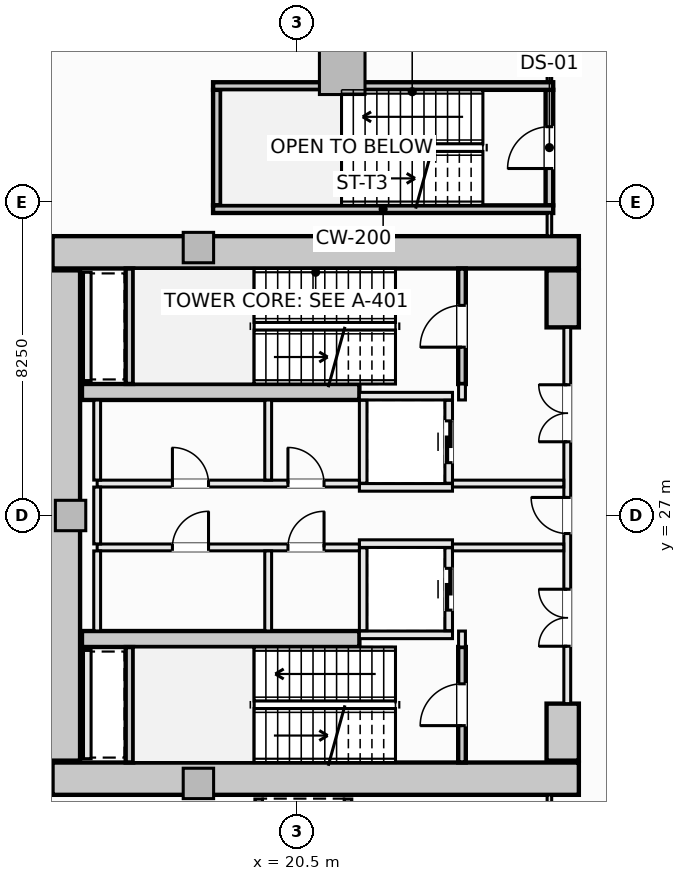
"""IFC4 building model, lengths in metres.
Left out: names, types, materials, properties, quantities, classifications, styles, units other than length and angle.
Written with IfcOpenShell. Run it as: python <this file> out.ifc"""

import sys

from ifc_helpers import new_model, si_unit, direction, frame, frame_2d, origin, origin_2d, place, context, subcontext, project, spatial, rectangle, extrude, element, fill, save


model = new_model("IFC4")
c1 = context("Model", 3, precision=1e-05, world=origin(), true_north=direction((0.0, 1.0)))
c2 = subcontext(c1, "Body", "Model", "MODEL_VIEW")
j1 = project(units=[si_unit("LENGTHUNIT", "METRE"), si_unit("PLANEANGLEUNIT", "RADIAN")], contexts=[c1])
p1 = place(None, origin())
s1 = spatial("IfcSite", under=j1, at=p1, CompositionType="ELEMENT")
p2 = place(p1, origin())
s2 = spatial("IfcBuilding", under=s1, at=p2, CompositionType="ELEMENT")
p3 = place(p2, frame((0.0, 0.0, -4.5)))
s3 = spatial("IfcBuildingStorey", under=s2, at=p3, CompositionType="ELEMENT", Elevation=-4.5)
for number, where, z_axis, x_axis in (
    (1, (14.075, 33.925, -0.32), (0.0, 0.0, 1.0), (1.0, 0.0, 0.0)),
    (2, (14.075, 20.075, -0.32), (0.0, 0.0, 1.0), (1.0, 0.0, 0.0)),
):
    element("IfcWall", number, at=place(p3, frame(where, z_axis=z_axis, x_axis=x_axis)), inside=s3, PredefinedType="SHEAR", context=c2, shape_type="SweptSolid", body=[
        extrude(rectangle(XDim=13.85, YDim=0.85, at=frame_2d((6.925, 0.0))), origin(), (0.0, 0.0, 1.0), 4.46),
    ])
p4 = place(p3, frame((14.375, 20.55, -0.32), z_axis=(0.0, 0.0, 1.0), x_axis=(0.0, 1.0, 0.0)))
e3 = element("IfcWall", 3, at=p4, inside=s3, PredefinedType="SHEAR", context=c2, shape_type="SweptSolid", body=[
    extrude(rectangle(XDim=12.9, YDim=0.85, at=frame_2d((6.45, 0.0))), origin(), (0.0, 0.0, 1.0), 4.46),
])
for number, where, z_axis, x_axis in (
    (4, (27.5, 31.95, -0.32), (0.0, 0.0, 1.0), (0.0, 1.0, 0.0)),
    (5, (27.5, 20.55, -0.32), (0.0, 0.0, 1.0), (0.0, 1.0, 0.0)),
):
    element("IfcWall", number, at=place(p3, frame(where, z_axis=z_axis, x_axis=x_axis)), inside=s3, PredefinedType="SHEAR", context=c2, shape_type="SweptSolid", body=[
        extrude(rectangle(XDim=1.5, YDim=0.85, at=frame_2d((0.75, 0.0))), origin(), (0.0, 0.0, 1.0), 4.46),
    ])
for number, where, z_axis, x_axis in (
    (6, (14.85, 30.25, -0.32), (0.0, 0.0, 1.0), (1.0, 0.0, 0.0)),
    (7, (14.85, 23.75, -0.32), (0.0, 0.0, 1.0), (1.0, 0.0, 0.0)),
):
    element("IfcWall", number, at=place(p3, frame(where, z_axis=z_axis, x_axis=x_axis)), inside=s3, PredefinedType="SHEAR", context=c2, shape_type="SweptSolid", body=[
        extrude(rectangle(XDim=7.3, YDim=0.42, at=frame_2d((3.65, 0.0))), origin(), (0.0, 0.0, 1.0), 4.46),
    ])
p5 = place(p3, frame((21.698, 38.677, -0.32), z_axis=(0.0, 0.0, 1.0), x_axis=(1.0, 0.0, 0.0)))
e8 = element("IfcColumn", 8, at=p5, inside=s3, PredefinedType="COLUMN", context=c2, shape_type="SweptSolid", body=[
    extrude(rectangle(XDim=1.2, YDim=1.2, at=origin_2d()), origin(), (0.0, 0.0, 1.0), 4.46),
])
for number, where, z_axis, x_axis in (
    (9, (17.914, 34.05, -0.32), (0.0, 0.0, 1.0), (1.0, 0.0, 0.0)),
    (10, (14.55, 27.0, -0.32), (0.0, 0.0, 1.0), (1.0, 0.0, 0.0)),
    (11, (17.914, 19.95, -0.32), (0.0, 0.0, 1.0), (1.0, 0.0, 0.0)),
):
    element("IfcColumn", number, at=place(p3, frame(where, z_axis=z_axis, x_axis=x_axis)), inside=s3, PredefinedType="PILASTER", context=c2, shape_type="SweptSolid", body=[
        extrude(rectangle(XDim=0.8, YDim=0.8, at=origin_2d()), origin(), (0.0, 0.0, 1.0), 4.46),
    ])
p6 = place(p3, frame((24.85, 30.46, -0.32), z_axis=(0.0, 0.0, 1.0), x_axis=(0.0, 1.0, 0.0)))
e12 = element("IfcWall", 12, at=p6, inside=s3, PredefinedType="SHEAR", context=c2, shape_type="SweptSolid", body=[
    extrude(rectangle(XDim=3.038, YDim=0.2, at=frame_2d((1.519, 0.0))), origin(), (0.0, 0.0, 1.0), 4.46),
])
p7 = place(p6, frame((0.969, 0.0, 0.32)))
e13 = element("IfcOpeningElement", 13, at=p7, cuts=e12, PredefinedType="OPENING", context=c2, shape_type="SweptSolid", body=[
    extrude(rectangle(XDim=1.1, YDim=2.15, at=frame_2d((0.55, 1.075))), frame((0.0, 0.11, 0.0), z_axis=(0.0, -1.0, 0.0), x_axis=(1.0, 0.0, 0.0)), (0.0, 0.0, 1.0), 0.22),
])
p8 = place(p3, frame((16.1, 30.462, -0.32), z_axis=(0.0, 0.0, 1.0), x_axis=(0.0, 1.0, 0.0)))
e14 = element("IfcWall", 14, at=p8, inside=s3, PredefinedType="SHEAR", context=c2, shape_type="SweptSolid", body=[
    extrude(rectangle(XDim=3.036, YDim=0.2, at=frame_2d((1.518, 0.0))), origin(), (0.0, 0.0, 1.0), 4.46),
])
p9 = place(p3, frame((24.85, 20.502, -0.32), z_axis=(0.0, 0.0, 1.0), x_axis=(0.0, 1.0, 0.0)))
e15 = element("IfcWall", 15, at=p9, inside=s3, PredefinedType="SHEAR", context=c2, shape_type="SweptSolid", body=[
    extrude(rectangle(XDim=3.038, YDim=0.2, at=frame_2d((1.519, 0.0))), origin(), (0.0, 0.0, 1.0), 4.46),
])
p10 = place(p9, frame((0.969, 0.0, 0.32)))
e16 = element("IfcOpeningElement", 16, at=p10, cuts=e15, PredefinedType="OPENING", context=c2, shape_type="SweptSolid", body=[
    extrude(rectangle(XDim=1.1, YDim=2.15, at=frame_2d((0.55, 1.075))), frame((0.0, 0.11, 0.0), z_axis=(0.0, -1.0, 0.0), x_axis=(1.0, 0.0, 0.0)), (0.0, 0.0, 1.0), 0.22),
])
p11 = place(p3, frame((16.1, 20.502, -0.32), z_axis=(0.0, 0.0, 1.0), x_axis=(0.0, 1.0, 0.0)))
e17 = element("IfcWall", 17, at=p11, inside=s3, PredefinedType="SHEAR", context=c2, shape_type="SweptSolid", body=[
    extrude(rectangle(XDim=3.036, YDim=0.2, at=frame_2d((1.518, 0.0))), origin(), (0.0, 0.0, 1.0), 4.46),
])
p12 = place(p3, frame((27.15, 35.16, -0.32), z_axis=(0.0, 0.0, 1.0), x_axis=(0.0, 1.0, 0.0)))
e18 = element("IfcWall", 18, at=p12, inside=s3, PredefinedType="SHEAR", context=c2, shape_type="SweptSolid", body=[
    extrude(rectangle(XDim=3.04, YDim=0.2, at=frame_2d((1.52, 0.0))), origin(), (0.0, 0.0, 1.0), 4.46),
])
p13 = place(p12, frame((0.97, 0.0, 0.32)))
e19 = element("IfcOpeningElement", 19, at=p13, cuts=e18, PredefinedType="OPENING", context=c2, shape_type="SweptSolid", body=[
    extrude(rectangle(XDim=1.1, YDim=2.15, at=frame_2d((0.55, 1.075))), frame((0.0, 0.11, 0.0), z_axis=(0.0, -1.0, 0.0), x_axis=(1.0, 0.0, 0.0)), (0.0, 0.0, 1.0), 0.22),
])
p14 = place(p3, frame((18.4, 35.16, -0.32), z_axis=(0.0, 0.0, 1.0), x_axis=(0.0, 1.0, 0.0)))
e20 = element("IfcWall", 20, at=p14, inside=s3, PredefinedType="SHEAR", context=c2, shape_type="SweptSolid", body=[
    extrude(rectangle(XDim=3.04, YDim=0.2, at=frame_2d((1.52, 0.0))), origin(), (0.0, 0.0, 1.0), 4.46),
])
for number, where, z_axis, x_axis in (
    (21, (18.3, 38.3, -0.32), (0.0, 0.0, 1.0), (1.0, 0.0, 0.0)),
    (22, (18.3, 35.06, -0.32), (0.0, 0.0, 1.0), (1.0, 0.0, 0.0)),
):
    element("IfcWall", number, at=place(p3, frame(where, z_axis=z_axis, x_axis=x_axis)), inside=s3, PredefinedType="SHEAR", context=c2, shape_type="SweptSolid", body=[
        extrude(rectangle(XDim=8.95, YDim=0.2, at=frame_2d((4.475, 0.0))), origin(), (0.0, 0.0, 1.0), 4.46),
    ])
for number, where, z_axis, x_axis in (
    (23, (22.15, 30.14, 0.0), (0.0, 0.0, 1.0), (1.0, 0.0, 0.0)),
    (24, (22.15, 27.74, 0.0), (0.0, 0.0, 1.0), (1.0, 0.0, 0.0)),
):
    element("IfcWall", number, at=place(p3, frame(where, z_axis=z_axis, x_axis=x_axis)), inside=s3, PredefinedType="SOLIDWALL", context=c2, shape_type="SweptSolid", body=[
        extrude(rectangle(XDim=2.45, YDim=0.2, at=frame_2d((1.225, 0.0))), origin(), (0.0, 0.0, 1.0), 4.14),
    ])
p15 = place(p3, frame((22.25, 27.85, 0.0), z_axis=(0.0, 0.0, 1.0), x_axis=(0.0, 1.0, 0.0)))
e25 = element("IfcWall", 25, at=p15, inside=s3, PredefinedType="SOLIDWALL", context=c2, shape_type="SweptSolid", body=[
    extrude(rectangle(XDim=2.18, YDim=0.2, at=frame_2d((1.09, 0.0))), origin(), (0.0, 0.0, 1.0), 4.14),
])
p16 = place(p3, frame((24.5, 27.85, 0.0), z_axis=(0.0, 0.0, 1.0), x_axis=(0.0, 1.0, 0.0)))
e26 = element("IfcWall", 26, at=p16, inside=s3, PredefinedType="SOLIDWALL", context=c2, shape_type="SweptSolid", body=[
    extrude(rectangle(XDim=2.18, YDim=0.2, at=frame_2d((1.09, 0.0))), origin(), (0.0, 0.0, 1.0), 4.14),
])
p17 = place(p16, frame((0.54, 0.0, 0.0)))
e27 = element("IfcOpeningElement", 27, at=p17, cuts=e26, PredefinedType="OPENING", context=c2, shape_type="SweptSolid", body=[
    extrude(rectangle(XDim=1.1, YDim=2.2, at=frame_2d((0.55, 1.1))), frame((0.0, 0.11, 0.0), z_axis=(0.0, -1.0, 0.0), x_axis=(1.0, 0.0, 0.0)), (0.0, 0.0, 1.0), 0.22),
])
for number, where, z_axis, x_axis in (
    (28, (22.15, 26.26, 0.0), (0.0, 0.0, 1.0), (1.0, 0.0, 0.0)),
    (29, (22.15, 23.86, 0.0), (0.0, 0.0, 1.0), (1.0, 0.0, 0.0)),
):
    element("IfcWall", number, at=place(p3, frame(where, z_axis=z_axis, x_axis=x_axis)), inside=s3, PredefinedType="SOLIDWALL", context=c2, shape_type="SweptSolid", body=[
        extrude(rectangle(XDim=2.45, YDim=0.2, at=frame_2d((1.225, 0.0))), origin(), (0.0, 0.0, 1.0), 4.14),
    ])
p18 = place(p3, frame((22.25, 23.97, 0.0), z_axis=(0.0, 0.0, 1.0), x_axis=(0.0, 1.0, 0.0)))
e30 = element("IfcWall", 30, at=p18, inside=s3, PredefinedType="SOLIDWALL", context=c2, shape_type="SweptSolid", body=[
    extrude(rectangle(XDim=2.18, YDim=0.2, at=frame_2d((1.09, 0.0))), origin(), (0.0, 0.0, 1.0), 4.14),
])
p19 = place(p3, frame((24.5, 23.97, 0.0), z_axis=(0.0, 0.0, 1.0), x_axis=(0.0, 1.0, 0.0)))
e31 = element("IfcWall", 31, at=p19, inside=s3, PredefinedType="SOLIDWALL", context=c2, shape_type="SweptSolid", body=[
    extrude(rectangle(XDim=2.18, YDim=0.2, at=frame_2d((1.09, 0.0))), origin(), (0.0, 0.0, 1.0), 4.14),
])
p20 = place(p19, frame((0.54, 0.0, 0.0)))
e32 = element("IfcOpeningElement", 32, at=p20, cuts=e31, PredefinedType="OPENING", context=c2, shape_type="SweptSolid", body=[
    extrude(rectangle(XDim=1.1, YDim=2.2, at=frame_2d((0.55, 1.1))), frame((0.0, 0.11, 0.0), z_axis=(0.0, -1.0, 0.0), x_axis=(1.0, 0.0, 0.0)), (0.0, 0.0, 1.0), 0.22),
])
for number, where, z_axis, x_axis in (
    (33, (19.5, 17.01, 0.0), (0.0, 0.0, 1.0), (0.0, 1.0, 0.0)),
    (34, (21.85, 17.01, 0.0), (0.0, 0.0, 1.0), (0.0, 1.0, 0.0)),
):
    element("IfcWall", number, at=place(p3, frame(where, z_axis=z_axis, x_axis=x_axis)), inside=s3, PredefinedType="SOLIDWALL", context=c2, shape_type="SweptSolid", body=[
        extrude(rectangle(XDim=2.53, YDim=0.2, at=frame_2d((1.265, 0.0))), origin(), (0.0, 0.0, 1.0), 4.14),
    ])
for number, where, z_axis, x_axis in (
    (35, (14.99, 30.55, 0.0), (0.0, 0.0, 1.0), (0.0, 1.0, 0.0)),
    (36, (14.99, 20.6, 0.0), (0.0, 0.0, 1.0), (0.0, 1.0, 0.0)),
):
    element("IfcWall", number, at=place(p3, frame(where, z_axis=z_axis, x_axis=x_axis)), inside=s3, PredefinedType="SOLIDWALL", context=c2, shape_type="SweptSolid", body=[
        extrude(rectangle(XDim=2.85, YDim=0.2, at=frame_2d((1.425, 0.0))), origin(), (0.0, 0.0, 1.0), 4.14),
    ])
for number, where, z_axis, x_axis in (
    (37, (24.85, 23.54, 0.0), (0.0, 0.0, 1.0), (0.0, 1.0, 0.0)),
    (38, (24.85, 30.04, 0.0), (0.0, 0.0, 1.0), (0.0, 1.0, 0.0)),
):
    element("IfcWall", number, at=place(p3, frame(where, z_axis=z_axis, x_axis=x_axis)), inside=s3, PredefinedType="SOLIDWALL", context=c2, shape_type="SweptSolid", body=[
        extrude(rectangle(XDim=0.42, YDim=0.18, at=frame_2d((0.21, 0.0))), origin(), (0.0, 0.0, 1.0), 4.14),
    ])
p21 = place(p3, frame((27.62, 22.05, 0.0), z_axis=(0.0, 0.0, 1.0), x_axis=(0.0, 1.0, 0.0)))
e39 = element("IfcWall", 39, at=p21, inside=s3, PredefinedType="SOLIDWALL", context=c2, shape_type="SweptSolid", body=[
    extrude(rectangle(XDim=9.9, YDim=0.18, at=frame_2d((4.95, 0.0))), origin(), (0.0, 0.0, 1.0), 3.232),
])
p22 = place(p21, frame((4.475, 0.0, 0.0)))
e40 = element("IfcOpeningElement", 40, at=p22, cuts=e39, PredefinedType="OPENING", context=c2, shape_type="SweptSolid", body=[
    extrude(rectangle(XDim=0.95, YDim=2.1, at=frame_2d((0.475, 1.05))), frame((0.0, 0.1, 0.0), z_axis=(0.0, -1.0, 0.0), x_axis=(1.0, 0.0, 0.0)), (0.0, 0.0, 1.0), 0.2),
])
p23 = place(p21, frame((6.89, 0.0, 0.0)))
e41 = element("IfcOpeningElement", 41, at=p23, cuts=e39, PredefinedType="OPENING", context=c2, shape_type="SweptSolid", body=[
    extrude(rectangle(XDim=1.5, YDim=2.2, at=frame_2d((0.75, 1.1))), frame((0.0, 0.1, 0.0), z_axis=(0.0, -1.0, 0.0), x_axis=(1.0, 0.0, 0.0)), (0.0, 0.0, 1.0), 0.2),
])
p24 = place(p21, frame((1.51, 0.0, 0.0)))
e42 = element("IfcOpeningElement", 42, at=p24, cuts=e39, PredefinedType="OPENING", context=c2, shape_type="SweptSolid", body=[
    extrude(rectangle(XDim=1.5, YDim=2.2, at=frame_2d((0.75, 1.1))), frame((0.0, 0.1, 0.0), z_axis=(0.0, -1.0, 0.0), x_axis=(1.0, 0.0, 0.0)), (0.0, 0.0, 1.0), 0.2),
])
p25 = place(p3, frame((15.25, 27.84, 0.0), z_axis=(0.0, 0.0, 1.0), x_axis=(1.0, 0.0, 0.0)))
e43 = element("IfcWall", 43, at=p25, inside=s3, PredefinedType="SOLIDWALL", context=c2, shape_type="SweptSolid", body=[
    extrude(rectangle(XDim=6.9, YDim=0.18, at=frame_2d((3.45, 0.0))), origin(), (0.0, 0.0, 1.0), 4.14),
])
p26 = place(p25, frame((5.02, 0.0, 0.0)))
e44 = element("IfcOpeningElement", 44, at=p26, cuts=e43, PredefinedType="OPENING", context=c2, shape_type="SweptSolid", body=[
    extrude(rectangle(XDim=0.95, YDim=2.1, at=frame_2d((0.475, 1.05))), frame((0.0, 0.1, 0.0), z_axis=(0.0, -1.0, 0.0), x_axis=(1.0, 0.0, 0.0)), (0.0, 0.0, 1.0), 0.2),
])
p27 = place(p25, frame((1.98, 0.0, 0.0)))
e45 = element("IfcOpeningElement", 45, at=p27, cuts=e43, PredefinedType="OPENING", context=c2, shape_type="SweptSolid", body=[
    extrude(rectangle(XDim=0.95, YDim=2.1, at=frame_2d((0.475, 1.05))), frame((0.0, 0.1, 0.0), z_axis=(0.0, -1.0, 0.0), x_axis=(1.0, 0.0, 0.0)), (0.0, 0.0, 1.0), 0.2),
])
p28 = place(p3, frame((24.6, 27.84, 0.0), z_axis=(0.0, 0.0, 1.0), x_axis=(1.0, 0.0, 0.0)))
e46 = element("IfcWall", 46, at=p28, inside=s3, PredefinedType="SOLIDWALL", context=c2, shape_type="SweptSolid", body=[
    extrude(rectangle(XDim=2.928, YDim=0.18, at=frame_2d((1.464, 0.0))), origin(), (0.0, 0.0, 1.0), 4.14),
])
p29 = place(p3, frame((15.25, 26.16, 0.0), z_axis=(0.0, 0.0, 1.0), x_axis=(1.0, 0.0, 0.0)))
e47 = element("IfcWall", 47, at=p29, inside=s3, PredefinedType="SOLIDWALL", context=c2, shape_type="SweptSolid", body=[
    extrude(rectangle(XDim=6.9, YDim=0.18, at=frame_2d((3.45, 0.0))), origin(), (0.0, 0.0, 1.0), 4.14),
])
p30 = place(p29, frame((5.02, 0.0, 0.0)))
e48 = element("IfcOpeningElement", 48, at=p30, cuts=e47, PredefinedType="OPENING", context=c2, shape_type="SweptSolid", body=[
    extrude(rectangle(XDim=0.95, YDim=2.1, at=frame_2d((0.475, 1.05))), frame((0.0, 0.1, 0.0), z_axis=(0.0, -1.0, 0.0), x_axis=(1.0, 0.0, 0.0)), (0.0, 0.0, 1.0), 0.2),
])
p31 = place(p29, frame((1.98, 0.0, 0.0)))
e49 = element("IfcOpeningElement", 49, at=p31, cuts=e47, PredefinedType="OPENING", context=c2, shape_type="SweptSolid", body=[
    extrude(rectangle(XDim=0.95, YDim=2.1, at=frame_2d((0.475, 1.05))), frame((0.0, 0.1, 0.0), z_axis=(0.0, -1.0, 0.0), x_axis=(1.0, 0.0, 0.0)), (0.0, 0.0, 1.0), 0.2),
])
p32 = place(p3, frame((24.6, 26.16, 0.0), z_axis=(0.0, 0.0, 1.0), x_axis=(1.0, 0.0, 0.0)))
e50 = element("IfcWall", 50, at=p32, inside=s3, PredefinedType="SOLIDWALL", context=c2, shape_type="SweptSolid", body=[
    extrude(rectangle(XDim=2.928, YDim=0.18, at=frame_2d((1.464, 0.0))), origin(), (0.0, 0.0, 1.0), 4.14),
])
p33 = place(p3, frame((15.25, 23.962, 0.0), z_axis=(0.0, 0.0, 1.0), x_axis=(0.0, 1.0, 0.0)))
e51 = element("IfcWall", 51, at=p33, inside=s3, PredefinedType="SOLIDWALL", context=c2, shape_type="SweptSolid", body=[
    extrude(rectangle(XDim=2.106, YDim=0.18, at=frame_2d((1.053, 0.0))), origin(), (0.0, 0.0, 1.0), 4.14),
])
p34 = place(p3, frame((15.25, 26.252, 0.0), z_axis=(0.0, 0.0, 1.0), x_axis=(0.0, 1.0, 0.0)))
e52 = element("IfcWall", 52, at=p34, inside=s3, PredefinedType="SOLIDWALL", context=c2, shape_type="SweptSolid", body=[
    extrude(rectangle(XDim=1.496, YDim=0.18, at=frame_2d((0.748, 0.0))), origin(), (0.0, 0.0, 1.0), 4.14),
])
for number, where, z_axis, x_axis in (
    (53, (15.25, 27.932, 0.0), (0.0, 0.0, 1.0), (0.0, 1.0, 0.0)),
    (54, (19.75, 23.962, 0.0), (0.0, 0.0, 1.0), (0.0, 1.0, 0.0)),
    (55, (19.75, 27.932, 0.0), (0.0, 0.0, 1.0), (0.0, 1.0, 0.0)),
):
    element("IfcWall", number, at=place(p3, frame(where, z_axis=z_axis, x_axis=x_axis)), inside=s3, PredefinedType="SOLIDWALL", context=c2, shape_type="SweptSolid", body=[
        extrude(rectangle(XDim=2.106, YDim=0.18, at=frame_2d((1.053, 0.0))), origin(), (0.0, 0.0, 1.0), 4.14),
    ])
p35 = place(p3, frame((27.15, 17.112, 0.0), z_axis=(0.0, 0.0, 1.0), x_axis=(0.0, 1.0, 0.0)))
e56 = element("IfcWall", 56, at=p35, inside=s3, PredefinedType="PARTITIONING", context=c2, shape_type="SweptSolid", body=[
    extrude(rectangle(XDim=2.536, YDim=0.12, at=frame_2d((1.268, 0.0))), origin(), (0.0, 0.0, 1.0), 4.14),
])
p36 = place(p3, frame((27.15, 34.352, 0.0), z_axis=(0.0, 0.0, 1.0), x_axis=(0.0, 1.0, 0.0)))
e57 = element("IfcWall", 57, at=p36, inside=s3, PredefinedType="PARTITIONING", context=c2, shape_type="SweptSolid", body=[
    extrude(rectangle(XDim=0.606, YDim=0.12, at=frame_2d((0.303, 0.0))), origin(), (0.0, 0.0, 1.0), 4.14),
])
p37 = place(p3, frame((27.15, 38.402, 0.0), z_axis=(0.0, 0.0, 1.0), x_axis=(0.0, 1.0, 0.0)))
e58 = element("IfcWall", 58, at=p37, inside=s3, PredefinedType="PARTITIONING", context=c2, shape_type="SweptSolid", body=[
    extrude(rectangle(XDim=12.398, YDim=0.12, at=frame_2d((6.199, 0.0))), origin(), (0.0, 0.0, 1.0), 4.14),
])
p38 = place(p37, frame((4.629, 0.0, 0.0)))
e59 = element("IfcOpeningElement", 59, at=p38, cuts=e58, PredefinedType="OPENING", context=c2, shape_type="SweptSolid", body=[
    extrude(rectangle(XDim=0.95, YDim=2.1, at=frame_2d((0.475, 1.05))), frame((0.0, 0.07, 0.0), z_axis=(0.0, -1.0, 0.0), x_axis=(1.0, 0.0, 0.0)), (0.0, 0.0, 1.0), 0.14),
])
p39 = place(p7, origin())
e60 = element("IfcDoor", 60, at=p39, inside=s3, OperationType="SINGLE_SWING_LEFT", PredefinedType="DOOR", context=c2, shape_type="SweptSolid", body=[
    extrude(rectangle(XDim=1.1, YDim=2.15, at=frame_2d((0.55, 1.075))), frame((0.0, 0.025, 0.0), z_axis=(0.0, -1.0, 0.0), x_axis=(1.0, 0.0, 0.0)), (0.0, 0.0, 1.0), 0.05),
])
fill(e13, e60)
p40 = place(p10, origin())
e61 = element("IfcDoor", 61, at=p40, inside=s3, OperationType="SINGLE_SWING_LEFT", PredefinedType="DOOR", context=c2, shape_type="SweptSolid", body=[
    extrude(rectangle(XDim=1.1, YDim=2.15, at=frame_2d((0.55, 1.075))), frame((0.0, 0.025, 0.0), z_axis=(0.0, -1.0, 0.0), x_axis=(1.0, 0.0, 0.0)), (0.0, 0.0, 1.0), 0.05),
])
fill(e16, e61)
p41 = place(p13, origin())
e62 = element("IfcDoor", 62, at=p41, inside=s3, OperationType="SINGLE_SWING_LEFT", PredefinedType="DOOR", context=c2, shape_type="SweptSolid", body=[
    extrude(rectangle(XDim=1.1, YDim=2.15, at=frame_2d((0.55, 1.075))), frame((0.0, 0.025, 0.0), z_axis=(0.0, -1.0, 0.0), x_axis=(1.0, 0.0, 0.0)), (0.0, 0.0, 1.0), 0.05),
])
fill(e19, e62)
p42 = place(p17, origin())
e63 = element("IfcDoor", 63, at=p42, inside=s3, OperationType="SLIDING_TO_LEFT", PredefinedType="DOOR", context=c2, shape_type="SweptSolid", body=[
    extrude(rectangle(XDim=1.1, YDim=2.2, at=frame_2d((0.55, 1.1))), frame((0.0, 0.025, 0.0), z_axis=(0.0, -1.0, 0.0), x_axis=(1.0, 0.0, 0.0)), (0.0, 0.0, 1.0), 0.05),
])
fill(e27, e63)
p43 = place(p20, origin())
e64 = element("IfcDoor", 64, at=p43, inside=s3, OperationType="SLIDING_TO_LEFT", PredefinedType="DOOR", context=c2, shape_type="SweptSolid", body=[
    extrude(rectangle(XDim=1.1, YDim=2.2, at=frame_2d((0.55, 1.1))), frame((0.0, 0.025, 0.0), z_axis=(0.0, -1.0, 0.0), x_axis=(1.0, 0.0, 0.0)), (0.0, 0.0, 1.0), 0.05),
])
fill(e32, e64)
p44 = place(p22, origin())
e65 = element("IfcDoor", 65, at=p44, inside=s3, OperationType="SINGLE_SWING_RIGHT", PredefinedType="DOOR", context=c2, shape_type="SweptSolid", body=[
    extrude(rectangle(XDim=0.95, YDim=2.1, at=frame_2d((0.475, 1.05))), frame((0.0, 0.025, 0.0), z_axis=(0.0, -1.0, 0.0), x_axis=(1.0, 0.0, 0.0)), (0.0, 0.0, 1.0), 0.05),
])
fill(e40, e65)
p45 = place(p23, origin())
e66 = element("IfcDoor", 66, at=p45, inside=s3, OperationType="DOUBLE_DOOR_SINGLE_SWING", PredefinedType="DOOR", context=c2, shape_type="SweptSolid", body=[
    extrude(rectangle(XDim=1.5, YDim=2.2, at=frame_2d((0.75, 1.1))), frame((0.0, 0.025, 0.0), z_axis=(0.0, -1.0, 0.0), x_axis=(1.0, 0.0, 0.0)), (0.0, 0.0, 1.0), 0.05),
])
fill(e41, e66)
p46 = place(p24, origin())
e67 = element("IfcDoor", 67, at=p46, inside=s3, OperationType="DOUBLE_DOOR_SINGLE_SWING", PredefinedType="DOOR", context=c2, shape_type="SweptSolid", body=[
    extrude(rectangle(XDim=1.5, YDim=2.2, at=frame_2d((0.75, 1.1))), frame((0.0, 0.025, 0.0), z_axis=(0.0, -1.0, 0.0), x_axis=(1.0, 0.0, 0.0)), (0.0, 0.0, 1.0), 0.05),
])
fill(e42, e67)
p47 = place(p26, origin())
e68 = element("IfcDoor", 68, at=p47, inside=s3, OperationType="SINGLE_SWING_LEFT", PredefinedType="DOOR", context=c2, shape_type="SweptSolid", body=[
    extrude(rectangle(XDim=0.95, YDim=2.1, at=frame_2d((0.475, 1.05))), frame((0.0, 0.025, 0.0), z_axis=(0.0, -1.0, 0.0), x_axis=(1.0, 0.0, 0.0)), (0.0, 0.0, 1.0), 0.05),
])
fill(e44, e68)
p48 = place(p30, origin())
e69 = element("IfcDoor", 69, at=p48, inside=s3, OperationType="SINGLE_SWING_RIGHT", PredefinedType="DOOR", context=c2, shape_type="SweptSolid", body=[
    extrude(rectangle(XDim=0.95, YDim=2.1, at=frame_2d((0.475, 1.05))), frame((0.0, 0.025, 0.0), z_axis=(0.0, -1.0, 0.0), x_axis=(1.0, 0.0, 0.0)), (0.0, 0.0, 1.0), 0.05),
])
fill(e48, e69)
p49 = place(p27, origin())
e70 = element("IfcDoor", 70, at=p49, inside=s3, OperationType="SINGLE_SWING_LEFT", PredefinedType="DOOR", context=c2, shape_type="SweptSolid", body=[
    extrude(rectangle(XDim=0.95, YDim=2.1, at=frame_2d((0.475, 1.05))), frame((0.0, 0.025, 0.0), z_axis=(0.0, -1.0, 0.0), x_axis=(1.0, 0.0, 0.0)), (0.0, 0.0, 1.0), 0.05),
])
fill(e45, e70)
p50 = place(p31, origin())
e71 = element("IfcDoor", 71, at=p50, inside=s3, OperationType="SINGLE_SWING_RIGHT", PredefinedType="DOOR", context=c2, shape_type="SweptSolid", body=[
    extrude(rectangle(XDim=0.95, YDim=2.1, at=frame_2d((0.475, 1.05))), frame((0.0, 0.025, 0.0), z_axis=(0.0, -1.0, 0.0), x_axis=(1.0, 0.0, 0.0)), (0.0, 0.0, 1.0), 0.05),
])
fill(e49, e71)
save(model, sys.argv[1])
